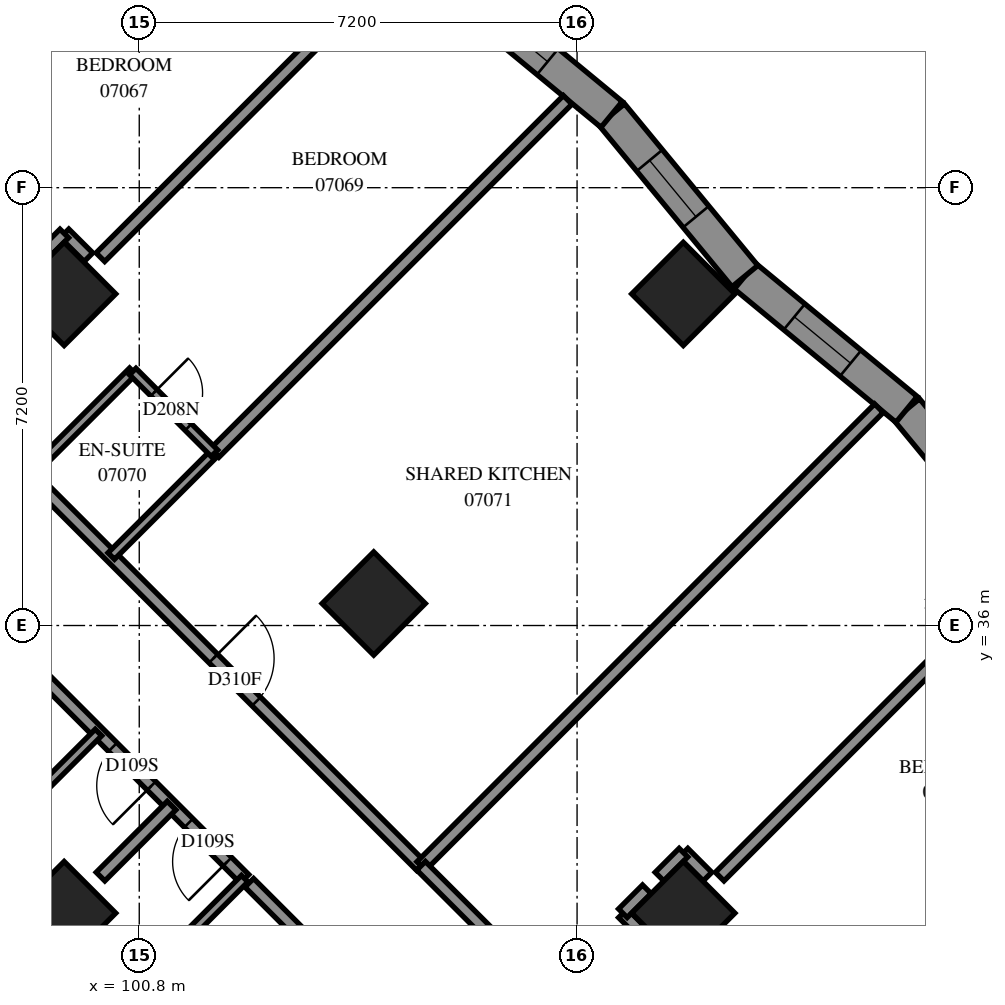
"""IFC4 building model, lengths in metres.
Left out: names, types, materials, properties, quantities, classifications, styles, units other than length and angle.
Written with IfcOpenShell. Run it as: python <this file> out.ifc"""

import sys

from ifc_helpers import new_model, si_unit, direction, frame, frame_2d, origin, origin_2d, place, context, subcontext, project, spatial, polyline, rectangle, outline, extrude, element, fill, save


model = new_model("IFC4")
c1 = context("Model", 3, precision=1e-05, world=origin(), true_north=direction((0.0, 1.0)))
c2 = subcontext(c1, "Body", "Model", "MODEL_VIEW")
j1 = project(units=[si_unit("LENGTHUNIT", "METRE"), si_unit("PLANEANGLEUNIT", "RADIAN")], contexts=[c1])
p1 = place(None, origin())
s1 = spatial("IfcSite", under=j1, at=p1, CompositionType="ELEMENT")
p2 = place(p1, origin())
s2 = spatial("IfcBuilding", under=s1, at=p2, CompositionType="ELEMENT")
p3 = place(p2, frame((0.0, 0.0, 30.4)))
s3 = spatial("IfcBuildingStorey", under=s2, at=p3, CompositionType="ELEMENT", Elevation=30.4)
for number, where, z_axis, x_axis in (
    (1, (99.565, 41.453, 0.0), (0.0, 0.0, 1.0), (0.707, -0.707, 0.0)),
    (2, (109.747, 41.453, 0.0), (0.0, 0.0, 1.0), (0.707, -0.707, 0.0)),
    (3, (104.656, 36.362, 0.0), (0.0, 0.0, 1.0), (0.707, -0.707, 0.0)),
    (4, (99.565, 31.271, 0.0), (0.0, 0.0, 1.0), (0.707, -0.707, 0.0)),
    (5, (109.747, 31.271, 0.0), (0.0, 0.0, 1.0), (0.707, -0.707, 0.0)),
):
    element("IfcColumn", number, at=place(p3, frame(where, z_axis=z_axis, x_axis=x_axis)), inside=s3, PredefinedType="COLUMN", context=c2, shape_type="SweptSolid", body=[
        extrude(rectangle(XDim=1.2, YDim=1.2, at=origin_2d()), origin(), (0.0, 0.0, 1.0), 3.1),
    ])
p4 = place(p3, frame((115.626, 36.877, 0.0), z_axis=(0.0, 0.0, 1.0), x_axis=(-0.6361415501, 0.7715723739, 0.0)))
e6 = element("IfcWall", 6, at=p4, inside=s3, PredefinedType="SOLIDWALL", context=c2, shape_type="SweptSolid", body=[
    extrude(outline(polyline([(0.05, -0.275), (3.496, -0.275), (3.443, 0.275), (-0.05, 0.275), (0.05, -0.275)])), origin(), (0.0, 0.0, 1.0), 3.1),
])
p5 = place(p4, frame((1.122, 0.0, 0.5)))
e7 = element("IfcOpeningElement", 7, at=p5, cuts=e6, PredefinedType="OPENING", context=c2, shape_type="SweptSolid", body=[
    extrude(rectangle(XDim=1.2, YDim=2.45, at=frame_2d((0.6, 1.225))), frame((0.0, 0.285, 0.0), z_axis=(0.0, -1.0, 0.0), x_axis=(1.0, 0.0, 0.0)), (0.0, 0.0, 1.0), 0.57),
])
p6 = place(p3, frame((113.419, 39.554, 0.0), z_axis=(0.0, 0.0, 1.0), x_axis=(-0.7715741005, 0.636139456, 0.0)))
e8 = element("IfcWall", 8, at=p6, inside=s3, PredefinedType="SOLIDWALL", context=c2, shape_type="SweptSolid", body=[
    extrude(outline(polyline([(-0.026, -0.275), (3.42, -0.275), (3.472, 0.275), (0.026, 0.275), (-0.026, -0.275)])), origin(), (0.0, 0.0, 1.0), 3.1),
])
p7 = place(p6, frame((1.194, 0.0, 0.5)))
e9 = element("IfcOpeningElement", 9, at=p7, cuts=e8, PredefinedType="OPENING", context=c2, shape_type="SweptSolid", body=[
    extrude(rectangle(XDim=1.2, YDim=2.45, at=frame_2d((0.6, 1.225))), frame((0.0, 0.285, 0.0), z_axis=(0.0, -1.0, 0.0), x_axis=(1.0, 0.0, 0.0)), (0.0, 0.0, 1.0), 0.57),
])
p8 = place(p3, frame((110.76, 41.746, 0.0), z_axis=(0.0, 0.0, 1.0), x_axis=(-0.636139456, 0.7715741005, 0.0)))
e10 = element("IfcWall", 10, at=p8, inside=s3, PredefinedType="SOLIDWALL", context=c2, shape_type="SweptSolid", body=[
    extrude(outline(polyline([(0.026, -0.275), (3.472, -0.275), (3.42, 0.275), (-0.026, 0.275), (0.026, -0.275)])), origin(), (0.0, 0.0, 1.0), 3.1),
])
p9 = place(p8, frame((1.266, 0.0, 0.5)))
e11 = element("IfcOpeningElement", 11, at=p9, cuts=e10, PredefinedType="OPENING", context=c2, shape_type="SweptSolid", body=[
    extrude(rectangle(XDim=1.2, YDim=2.45, at=frame_2d((0.6, 1.225))), frame((0.0, 0.285, 0.0), z_axis=(0.0, -1.0, 0.0), x_axis=(1.0, 0.0, 0.0)), (0.0, 0.0, 1.0), 0.57),
])
p10 = place(p3, frame((108.568, 44.405, 0.0), z_axis=(0.0, 0.0, 1.0), x_axis=(-0.7715741005, 0.636139456, 0.0)))
e12 = element("IfcWall", 12, at=p10, inside=s3, PredefinedType="SOLIDWALL", context=c2, shape_type="SweptSolid", body=[
    extrude(outline(polyline([(-0.026, -0.275), (3.42, -0.275), (3.472, 0.275), (0.026, 0.275), (-0.026, -0.275)])), origin(), (0.0, 0.0, 1.0), 3.1),
])
p11 = place(p10, frame((1.364, 0.0, 0.5)))
e13 = element("IfcOpeningElement", 13, at=p11, cuts=e12, PredefinedType="OPENING", context=c2, shape_type="SweptSolid", body=[
    extrude(rectangle(XDim=1.2, YDim=2.45, at=frame_2d((0.6, 1.225))), frame((0.0, 0.285, 0.0), z_axis=(0.0, -1.0, 0.0), x_axis=(1.0, 0.0, 0.0)), (0.0, 0.0, 1.0), 0.57),
])
p12 = place(p3, frame((94.895, 42.581, 0.0), z_axis=(0.0, 0.0, 1.0), x_axis=(0.7071067812, -0.7071067812, 0.0)))
e14 = element("IfcWall", 14, at=p12, inside=s3, PredefinedType="PARTITIONING", context=c2, shape_type="SweptSolid", body=[
    extrude(rectangle(XDim=14.9, YDim=0.2, at=frame_2d((7.45, 0.0))), origin(), (0.0, 0.0, 1.0), 3.1),
])
p13 = place(p12, frame((2.8, 0.0, 0.0)))
e15 = element("IfcOpeningElement", 15, at=p13, cuts=e14, PredefinedType="OPENING", context=c2, shape_type="SweptSolid", body=[
    extrude(rectangle(XDim=0.9, YDim=2.1, at=frame_2d((0.45, 1.05))), frame((0.0, 0.11, 0.0), z_axis=(0.0, -1.0, 0.0), x_axis=(1.0, 0.0, 0.0)), (0.0, 0.0, 1.0), 0.22),
])
p14 = place(p12, frame((4.348, 0.0, 0.0)))
e16 = element("IfcOpeningElement", 16, at=p14, cuts=e14, PredefinedType="OPENING", context=c2, shape_type="SweptSolid", body=[
    extrude(rectangle(XDim=0.9, YDim=2.1, at=frame_2d((0.45, 1.05))), frame((0.0, 0.11, 0.0), z_axis=(0.0, -1.0, 0.0), x_axis=(1.0, 0.0, 0.0)), (0.0, 0.0, 1.0), 0.22),
])
p15 = place(p12, frame((10.073, 0.0, 0.0)))
e17 = element("IfcOpeningElement", 17, at=p15, cuts=e14, PredefinedType="OPENING", context=c2, shape_type="SweptSolid", body=[
    extrude(rectangle(XDim=1.0, YDim=2.1, at=frame_2d((0.5, 1.05))), frame((0.0, 0.11, 0.0), z_axis=(0.0, -1.0, 0.0), x_axis=(1.0, 0.0, 0.0)), (0.0, 0.0, 1.0), 0.22),
])
p16 = place(p3, frame((102.609, 31.769, 0.0), z_axis=(0.0, 0.0, 1.0), x_axis=(0.7071067812, -0.7071067812, 0.0)))
e18 = element("IfcWall", 18, at=p16, inside=s3, PredefinedType="PARTITIONING", context=c2, shape_type="SweptSolid", body=[
    extrude(rectangle(XDim=10.723, YDim=0.2, at=frame_2d((5.361, 0.0))), origin(), (0.0, 0.0, 1.0), 3.1),
])
p17 = place(p16, frame((4.15, 0.0, 0.0)))
e19 = element("IfcOpeningElement", 19, at=p17, cuts=e18, PredefinedType="OPENING", context=c2, shape_type="SweptSolid", body=[
    extrude(rectangle(XDim=0.9, YDim=2.1, at=frame_2d((0.45, 1.05))), frame((0.0, 0.11, 0.0), z_axis=(0.0, -1.0, 0.0), x_axis=(1.0, 0.0, 0.0)), (0.0, 0.0, 1.0), 0.22),
])
p18 = place(p16, frame((5.8, 0.0, 0.0)))
e20 = element("IfcOpeningElement", 20, at=p18, cuts=e18, PredefinedType="OPENING", context=c2, shape_type="SweptSolid", body=[
    extrude(rectangle(XDim=0.9, YDim=2.1, at=frame_2d((0.45, 1.05))), frame((0.0, 0.11, 0.0), z_axis=(0.0, -1.0, 0.0), x_axis=(1.0, 0.0, 0.0)), (0.0, 0.0, 1.0), 0.22),
])
p19 = place(p3, frame((105.437, 32.045, 0.0), z_axis=(0.0, 0.0, 1.0), x_axis=(0.7070175341, 0.707196017, 0.0)))
e21 = element("IfcWall", 21, at=p19, inside=s3, PredefinedType="PARTITIONING", context=c2, shape_type="SweptSolid", body=[
    extrude(rectangle(XDim=10.645, YDim=0.2, at=frame_2d((5.323, 0.0))), origin(), (0.0, 0.0, 1.0), 3.1),
])
p20 = place(p3, frame((94.901, 42.583, 0.0), z_axis=(0.0, 0.0, 1.0), x_axis=(0.7072154749, 0.7069980708, 0.0)))
e22 = element("IfcWall", 22, at=p20, inside=s3, PredefinedType="PARTITIONING", context=c2, shape_type="SweptSolid", body=[
    extrude(rectangle(XDim=9.2, YDim=0.2, at=frame_2d((4.6, 0.0))), origin(), (0.0, 0.0, 1.0), 3.1),
])
p21 = place(p3, frame((102.039, 38.837, 0.0), z_axis=(0.0, 0.0, 1.0), x_axis=(0.7071067812, 0.7071067812, 0.0)))
e23 = element("IfcWall", 23, at=p21, inside=s3, PredefinedType="PARTITIONING", context=c2, shape_type="SweptSolid", body=[
    extrude(rectangle(XDim=8.212, YDim=0.2, at=frame_2d((4.106, 0.0))), origin(), (0.0, 0.0, 1.0), 3.1),
])
p22 = place(p3, frame((96.947, 43.929, 0.0), z_axis=(0.0, 0.0, 1.0), x_axis=(0.707112894, 0.7071006683, 0.0)))
e24 = element("IfcWall", 24, at=p22, inside=s3, PredefinedType="PARTITIONING", context=c2, shape_type="SweptSolid", body=[
    extrude(rectangle(XDim=8.18, YDim=0.2, at=frame_2d((4.09, 0.0))), origin(), (0.0, 0.0, 1.0), 3.1),
])
p23 = place(p3, frame((102.531, 31.833, 0.0), z_axis=(0.0, 0.0, 1.0), x_axis=(-0.7070095491, 0.7072039999, 0.0)))
e25 = element("IfcWall", 25, at=p23, inside=s3, PredefinedType="PARTITIONING", context=c2, shape_type="SweptSolid", body=[
    extrude(rectangle(XDim=7.2, YDim=0.2, at=frame_2d((3.6, 0.0))), origin(), (0.0, 0.0, 1.0), 3.1),
])
p24 = place(p23, frame((2.165, 0.0, 0.0)))
e26 = element("IfcOpeningElement", 26, at=p24, cuts=e25, PredefinedType="OPENING", context=c2, shape_type="SweptSolid", body=[
    extrude(rectangle(XDim=0.9, YDim=2.1, at=frame_2d((0.45, 1.05))), frame((0.0, 0.11, 0.0), z_axis=(0.0, -1.0, 0.0), x_axis=(1.0, 0.0, 0.0)), (0.0, 0.0, 1.0), 0.22),
])
p25 = place(p23, frame((0.4, 0.0, 0.0)))
e27 = element("IfcOpeningElement", 27, at=p25, cuts=e25, PredefinedType="OPENING", context=c2, shape_type="SweptSolid", body=[
    extrude(rectangle(XDim=0.9, YDim=2.1, at=frame_2d((0.45, 1.05))), frame((0.0, 0.11, 0.0), z_axis=(0.0, -1.0, 0.0), x_axis=(1.0, 0.0, 0.0)), (0.0, 0.0, 1.0), 0.22),
])
p26 = place(p3, frame((110.345, 31.871, 0.0), z_axis=(0.0, 0.0, 1.0), x_axis=(0.7071067812, 0.7071067812, 0.0)))
e28 = element("IfcWall", 28, at=p26, inside=s3, PredefinedType="PARTITIONING", context=c2, shape_type="SweptSolid", body=[
    extrude(rectangle(XDim=5.504, YDim=0.2, at=frame_2d((2.752, 0.0))), origin(), (0.0, 0.0, 1.0), 3.1),
])
p27 = place(p3, frame((100.161, 42.057, 0.0), z_axis=(0.0, 0.0, 1.0), x_axis=(0.7072884866, 0.706925029, 0.0)))
e29 = element("IfcWall", 29, at=p27, inside=s3, PredefinedType="PARTITIONING", context=c2, shape_type="SweptSolid", body=[
    extrude(rectangle(XDim=5.503, YDim=0.2, at=frame_2d((2.751, 0.0))), origin(), (0.0, 0.0, 1.0), 3.1),
])
p28 = place(p3, frame((105.435, 32.049, 0.0), z_axis=(0.0, 0.0, 1.0), x_axis=(0.7074545101, -0.7067588812, 0.0)))
e30 = element("IfcWall", 30, at=p28, inside=s3, PredefinedType="PARTITIONING", context=c2, shape_type="SweptSolid", body=[
    extrude(rectangle(XDim=2.875, YDim=0.2, at=frame_2d((1.438, 0.0))), origin(), (0.0, 0.0, 1.0), 3.1),
])
for number, where, z_axis, x_axis in (
    (31, (100.34, 37.142, 0.0), (0.0, 0.0, 1.0), (0.708, 0.707, 0.0)),
    (32, (98.996, 38.486, 0.0), (0.0, 0.0, 1.0), (0.708, 0.707, 0.0)),
):
    element("IfcWall", number, at=place(p3, frame(where, z_axis=z_axis, x_axis=x_axis)), inside=s3, PredefinedType="PARTITIONING", context=c2, shape_type="SweptSolid", body=[
        extrude(rectangle(XDim=2.4, YDim=0.15, at=frame_2d((1.2, 0.0))), origin(), (0.0, 0.0, 1.0), 3.1),
    ])
for number, where, z_axis, x_axis in (
    (33, (100.837, 30.141, 0.0), (0.0, 0.0, 1.0), (0.707, 0.707, 0.0)),
    (34, (98.433, 32.545, 0.0), (0.0, 0.0, 1.0), (0.707, 0.707, 0.0)),
):
    element("IfcWall", number, at=place(p3, frame(where, z_axis=z_axis, x_axis=x_axis)), inside=s3, PredefinedType="PARTITIONING", context=c2, shape_type="SweptSolid", body=[
        extrude(rectangle(XDim=2.398, YDim=0.15, at=frame_2d((1.199, 0.0))), origin(), (0.0, 0.0, 1.0), 3.1),
    ])
p29 = place(p3, frame((100.693, 40.177, 0.0), z_axis=(0.0, 0.0, 1.0), x_axis=(0.7071067812, -0.7071067812, 0.0)))
e35 = element("IfcWall", 35, at=p29, inside=s3, PredefinedType="PARTITIONING", context=c2, shape_type="SweptSolid", body=[
    extrude(rectangle(XDim=1.901, YDim=0.15, at=frame_2d((0.95, 0.0))), origin(), (0.0, 0.0, 1.0), 3.1),
])
p30 = place(p29, frame((0.493, 0.0, 0.0)))
e36 = element("IfcOpeningElement", 36, at=p30, cuts=e35, PredefinedType="OPENING", context=c2, shape_type="SweptSolid", body=[
    extrude(rectangle(XDim=0.8, YDim=2.1, at=frame_2d((0.4, 1.05))), frame((0.0, 0.085, 0.0), z_axis=(0.0, -1.0, 0.0), x_axis=(1.0, 0.0, 0.0)), (0.0, 0.0, 1.0), 0.17),
])
p31 = place(p3, frame((100.163, 31.871, 0.0), z_axis=(0.0, 0.0, 1.0), x_axis=(0.7071067812, 0.7071067812, 0.0)))
e37 = element("IfcWall", 37, at=p31, inside=s3, PredefinedType="PARTITIONING", context=c2, shape_type="SweptSolid", body=[
    extrude(rectangle(XDim=1.652, YDim=0.2, at=frame_2d((0.826, 0.0))), origin(), (0.0, 0.0, 1.0), 3.1),
])
for number, where, z_axis, x_axis in (
    (38, (108.754, 31.268, 0.0), (0.0, 0.0, 1.0), (0.707, -0.707, 0.0)),
    (39, (109.751, 32.265, 0.0), (0.0, 0.0, 1.0), (0.707, -0.707, 0.0)),
    (40, (109.355, 31.871, 0.0), (0.0, 0.0, 1.0), (0.707, 0.707, 0.0)),
    (41, (108.753, 31.269, 0.0), (0.0, 0.0, 1.0), (0.707, 0.707, 0.0)),
):
    element("IfcWall", number, at=place(p3, frame(where, z_axis=z_axis, x_axis=x_axis)), inside=s3, PredefinedType="PARTITIONING", context=c2, shape_type="SweptSolid", body=[
        extrude(rectangle(XDim=0.557, YDim=0.2, at=frame_2d((0.279, 0.0))), origin(), (0.0, 0.0, 1.0), 3.1),
    ])
p32 = place(p3, frame((99.571, 42.449, 0.0), z_axis=(0.0, 0.0, 1.0), x_axis=(0.7089037401, -0.705305244, 0.0)))
e42 = element("IfcWall", 42, at=p32, inside=s3, PredefinedType="PARTITIONING", context=c2, shape_type="SweptSolid", body=[
    extrude(rectangle(XDim=0.556, YDim=0.2, at=frame_2d((0.278, 0.0))), origin(), (0.0, 0.0, 1.0), 3.1),
])
p33 = place(p3, frame((99.175, 42.055, 0.0), z_axis=(0.0, 0.0, 1.0), x_axis=(0.7071067812, 0.7071067812, 0.0)))
e43 = element("IfcWall", 43, at=p33, inside=s3, PredefinedType="PARTITIONING", context=c2, shape_type="SweptSolid", body=[
    extrude(rectangle(XDim=0.554, YDim=0.2, at=frame_2d((0.277, 0.0))), origin(), (0.0, 0.0, 1.0), 3.1),
])
p34 = place(p7, origin())
e44 = element("IfcWindow", 44, at=p34, inside=s3, PartitioningType="SINGLE_PANEL", PredefinedType="WINDOW", context=c2, shape_type="SweptSolid", body=[
    extrude(rectangle(XDim=1.2, YDim=2.45, at=frame_2d((0.6, 1.225))), frame((0.0, 0.155, 0.0), z_axis=(0.0, -1.0, 0.0), x_axis=(1.0, 0.0, 0.0)), (0.0, 0.0, 1.0), 0.06),
])
fill(e9, e44)
p35 = place(p9, origin())
e45 = element("IfcWindow", 45, at=p35, inside=s3, PartitioningType="SINGLE_PANEL", PredefinedType="WINDOW", context=c2, shape_type="SweptSolid", body=[
    extrude(rectangle(XDim=1.2, YDim=2.45, at=frame_2d((0.6, 1.225))), frame((0.0, 0.155, 0.0), z_axis=(0.0, -1.0, 0.0), x_axis=(1.0, 0.0, 0.0)), (0.0, 0.0, 1.0), 0.06),
])
fill(e11, e45)
p36 = place(p11, origin())
e46 = element("IfcWindow", 46, at=p36, inside=s3, PartitioningType="SINGLE_PANEL", PredefinedType="WINDOW", context=c2, shape_type="SweptSolid", body=[
    extrude(rectangle(XDim=1.2, YDim=2.45, at=frame_2d((0.6, 1.225))), frame((0.0, 0.155, 0.0), z_axis=(0.0, -1.0, 0.0), x_axis=(1.0, 0.0, 0.0)), (0.0, 0.0, 1.0), 0.06),
])
fill(e13, e46)
p37 = place(p30, origin())
e47 = element("IfcDoor", 47, at=p37, inside=s3, OperationType="SINGLE_SWING_RIGHT", PredefinedType="DOOR", context=c2, shape_type="SweptSolid", body=[
    extrude(rectangle(XDim=0.8, YDim=2.1, at=frame_2d((0.4, 1.05))), frame((0.0, 0.025, 0.0), z_axis=(0.0, -1.0, 0.0), x_axis=(1.0, 0.0, 0.0)), (0.0, 0.0, 1.0), 0.05),
])
fill(e36, e47)
p38 = place(p15, origin())
e48 = element("IfcDoor", 48, at=p38, inside=s3, OperationType="SINGLE_SWING_RIGHT", PredefinedType="DOOR", context=c2, shape_type="SweptSolid", body=[
    extrude(rectangle(XDim=1.0, YDim=2.1, at=frame_2d((0.5, 1.05))), frame((0.0, 0.025, 0.0), z_axis=(0.0, -1.0, 0.0), x_axis=(1.0, 0.0, 0.0)), (0.0, 0.0, 1.0), 0.05),
])
fill(e17, e48)
p39 = place(p24, origin())
e49 = element("IfcDoor", 49, at=p39, inside=s3, OperationType="SINGLE_SWING_LEFT", PredefinedType="DOOR", context=c2, shape_type="SweptSolid", body=[
    extrude(rectangle(XDim=0.9, YDim=2.1, at=frame_2d((0.45, 1.05))), frame((0.0, 0.025, 0.0), z_axis=(0.0, -1.0, 0.0), x_axis=(1.0, 0.0, 0.0)), (0.0, 0.0, 1.0), 0.05),
])
fill(e26, e49)
p40 = place(p25, origin())
e50 = element("IfcDoor", 50, at=p40, inside=s3, OperationType="SINGLE_SWING_RIGHT", PredefinedType="DOOR", context=c2, shape_type="SweptSolid", body=[
    extrude(rectangle(XDim=0.9, YDim=2.1, at=frame_2d((0.45, 1.05))), frame((0.0, 0.025, 0.0), z_axis=(0.0, -1.0, 0.0), x_axis=(1.0, 0.0, 0.0)), (0.0, 0.0, 1.0), 0.05),
])
fill(e27, e50)
save(model, sys.argv[1])
